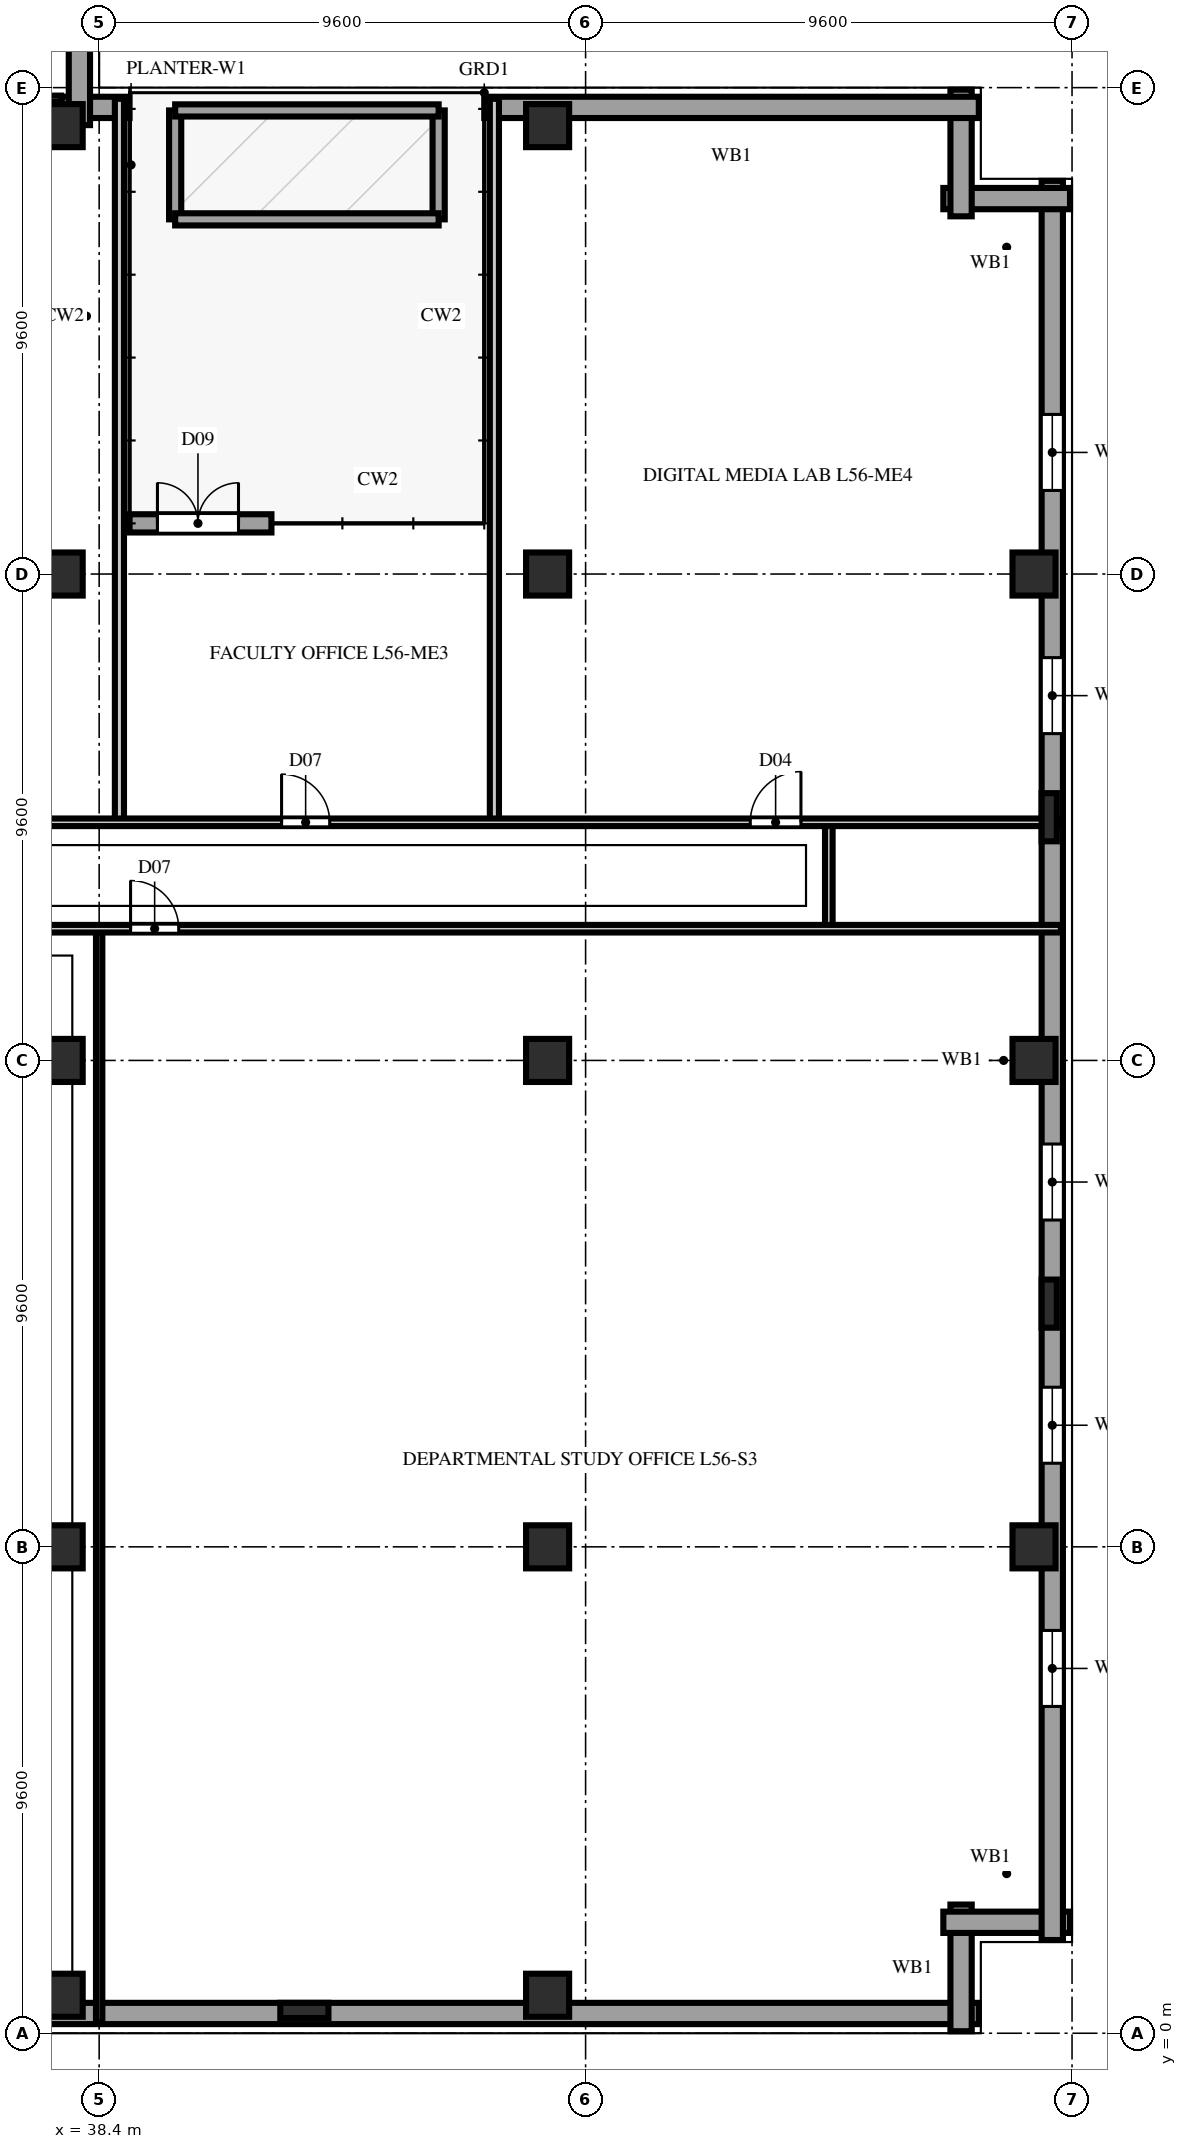
"""IFC4 building model, lengths in metres.
Left out: names, types, materials, properties, quantities, classifications, styles, units other than length and angle.
Written with IfcOpenShell. Run it as: python <this file> out.ifc"""

import sys

from ifc_helpers import new_model, si_unit, direction, frame, frame_2d, origin, origin_2d, place, context, subcontext, project, spatial, rectangle, extrude, element, fill, save


model = new_model("IFC4")
c1 = context("Model", 3, precision=1e-05, world=origin(), true_north=direction((0.0, 1.0)))
c2 = subcontext(c1, "Body", "Model", "MODEL_VIEW")
j1 = project(units=[si_unit("LENGTHUNIT", "METRE"), si_unit("PLANEANGLEUNIT", "RADIAN")], contexts=[c1])
p1 = place(None, origin())
s1 = spatial("IfcSite", under=j1, at=p1, CompositionType="ELEMENT")
p2 = place(p1, origin())
s2 = spatial("IfcBuilding", under=s1, at=p2, CompositionType="ELEMENT")
p3 = place(p2, frame((0.0, 0.0, 221.8)))
s3 = spatial("IfcBuildingStorey", under=s2, at=p3, CompositionType="ELEMENT", Elevation=221.8)
for number, where, z_axis, x_axis in (
    (1, (37.65, 0.75, 0.0), (0.0, 0.0, 1.0), (1.0, 0.0, 0.0)),
    (2, (37.65, 9.6, 0.0), (0.0, 0.0, 1.0), (1.0, 0.0, 0.0)),
    (3, (37.65, 19.2, 0.0), (0.0, 0.0, 1.0), (1.0, 0.0, 0.0)),
    (4, (37.65, 28.8, 0.0), (0.0, 0.0, 1.0), (1.0, 0.0, 0.0)),
    (5, (37.65, 37.65, 0.0), (0.0, 0.0, 1.0), (1.0, 0.0, 0.0)),
    (6, (47.25, 0.75, 0.0), (0.0, 0.0, 1.0), (1.0, 0.0, 0.0)),
    (7, (47.25, 9.6, 0.0), (0.0, 0.0, 1.0), (1.0, 0.0, 0.0)),
    (8, (47.25, 19.2, 0.0), (0.0, 0.0, 1.0), (1.0, 0.0, 0.0)),
    (9, (47.25, 28.8, 0.0), (0.0, 0.0, 1.0), (1.0, 0.0, 0.0)),
    (10, (47.25, 37.65, 0.0), (0.0, 0.0, 1.0), (1.0, 0.0, 0.0)),
    (11, (56.85, 9.6, 0.0), (0.0, 0.0, 1.0), (1.0, 0.0, 0.0)),
    (12, (56.85, 19.2, 0.0), (0.0, 0.0, 1.0), (1.0, 0.0, 0.0)),
    (13, (56.85, 28.8, 0.0), (0.0, 0.0, 1.0), (1.0, 0.0, 0.0)),
):
    element("IfcColumn", number, at=place(p3, frame(where, z_axis=z_axis, x_axis=x_axis)), inside=s3, PredefinedType="COLUMN", context=c2, shape_type="SweptSolid", body=[
        extrude(rectangle(XDim=0.85, YDim=0.85, at=origin_2d()), origin(), (0.0, 0.0, 1.0), 3.8),
    ])
for number, where, z_axis, x_axis in (
    (14, (42.45, 0.45, 0.0), (0.0, 0.0, 1.0), (1.0, 0.0, 0.0)),
    (15, (57.15, 14.4, 0.0), (0.0, 0.0, 1.0), (0.0, 1.0, 0.0)),
    (16, (57.15, 24.0, 0.0), (0.0, 0.0, 1.0), (0.0, 1.0, 0.0)),
):
    element("IfcColumn", number, at=place(p3, frame(where, z_axis=z_axis, x_axis=x_axis)), inside=s3, PredefinedType="PILASTER", context=c2, shape_type="SweptSolid", body=[
        extrude(rectangle(XDim=0.95, YDim=0.3, at=origin_2d()), origin(), (0.0, 0.0, 1.0), 3.8),
    ])
p4 = place(p3, frame((1.84, 0.39, 0.0), z_axis=(0.0, 0.0, 1.0), x_axis=(1.0, 0.0, 0.0)))
e17 = element("IfcWall", 17, at=p4, inside=s3, PredefinedType="SOLIDWALL", context=c2, shape_type="SweptSolid", body=[
    extrude(rectangle(XDim=53.92, YDim=0.42, at=frame_2d((26.96, 0.0))), origin(), (0.0, 0.0, 1.0), 3.54),
])
p5 = place(p4, frame((3.86, 0.0, 0.75)))
e18 = element("IfcOpeningElement", 18, at=p5, cuts=e17, PredefinedType="OPENING", context=c2, shape_type="SweptSolid", body=[
    extrude(rectangle(XDim=3.0, YDim=1.9, at=frame_2d((1.5, 0.95))), frame((0.0, 0.222, 0.0), z_axis=(0.0, -1.0, 0.0), x_axis=(1.0, 0.0, 0.0)), (0.0, 0.0, 1.0), 0.444),
])
p6 = place(p4, frame((8.66, 0.0, 0.75)))
e19 = element("IfcOpeningElement", 19, at=p6, cuts=e17, PredefinedType="OPENING", context=c2, shape_type="SweptSolid", body=[
    extrude(rectangle(XDim=3.0, YDim=1.9, at=frame_2d((1.5, 0.95))), frame((0.0, 0.222, 0.0), z_axis=(0.0, -1.0, 0.0), x_axis=(1.0, 0.0, 0.0)), (0.0, 0.0, 1.0), 0.444),
])
p7 = place(p4, frame((18.26, 0.0, 0.75)))
e20 = element("IfcOpeningElement", 20, at=p7, cuts=e17, PredefinedType="OPENING", context=c2, shape_type="SweptSolid", body=[
    extrude(rectangle(XDim=3.0, YDim=1.9, at=frame_2d((1.5, 0.95))), frame((0.0, 0.222, 0.0), z_axis=(0.0, -1.0, 0.0), x_axis=(1.0, 0.0, 0.0)), (0.0, 0.0, 1.0), 0.444),
])
for number, where, z_axis, x_axis in (
    (21, (55.41, 0.04, 0.0), (0.0, 0.0, 1.0), (0.0, 1.0, 0.0)),
    (22, (55.06, 2.19, 0.0), (0.0, 0.0, 1.0), (1.0, 0.0, 0.0)),
):
    element("IfcWall", number, at=place(p3, frame(where, z_axis=z_axis, x_axis=x_axis)), inside=s3, PredefinedType="SOLIDWALL", context=c2, shape_type="SweptSolid", body=[
        extrude(rectangle(XDim=2.5, YDim=0.42, at=frame_2d((1.25, 0.0))), origin(), (0.0, 0.0, 1.0), 3.54),
    ])
p8 = place(p3, frame((57.21, 1.84, 0.0), z_axis=(0.0, 0.0, 1.0), x_axis=(0.0, 1.0, 0.0)))
e23 = element("IfcWall", 23, at=p8, inside=s3, PredefinedType="SOLIDWALL", context=c2, shape_type="SweptSolid", body=[
    extrude(rectangle(XDim=34.72, YDim=0.42, at=frame_2d((17.36, 0.0))), origin(), (0.0, 0.0, 1.0), 3.54),
])
p9 = place(p8, frame((4.61, 0.0, 0.85)))
e24 = element("IfcOpeningElement", 24, at=p9, cuts=e23, PredefinedType="OPENING", context=c2, shape_type="SweptSolid", body=[
    extrude(rectangle(XDim=1.5, YDim=1.85, at=frame_2d((0.75, 0.925))), frame((0.0, 0.222, 0.0), z_axis=(0.0, -1.0, 0.0), x_axis=(1.0, 0.0, 0.0)), (0.0, 0.0, 1.0), 0.444),
])
p10 = place(p8, frame((9.41, 0.0, 0.85)))
e25 = element("IfcOpeningElement", 25, at=p10, cuts=e23, PredefinedType="OPENING", context=c2, shape_type="SweptSolid", body=[
    extrude(rectangle(XDim=1.5, YDim=1.85, at=frame_2d((0.75, 0.925))), frame((0.0, 0.222, 0.0), z_axis=(0.0, -1.0, 0.0), x_axis=(1.0, 0.0, 0.0)), (0.0, 0.0, 1.0), 0.444),
])
p11 = place(p8, frame((14.21, 0.0, 0.85)))
e26 = element("IfcOpeningElement", 26, at=p11, cuts=e23, PredefinedType="OPENING", context=c2, shape_type="SweptSolid", body=[
    extrude(rectangle(XDim=1.5, YDim=1.85, at=frame_2d((0.75, 0.925))), frame((0.0, 0.222, 0.0), z_axis=(0.0, -1.0, 0.0), x_axis=(1.0, 0.0, 0.0)), (0.0, 0.0, 1.0), 0.444),
])
p12 = place(p8, frame((23.81, 0.0, 0.85)))
e27 = element("IfcOpeningElement", 27, at=p12, cuts=e23, PredefinedType="OPENING", context=c2, shape_type="SweptSolid", body=[
    extrude(rectangle(XDim=1.5, YDim=1.85, at=frame_2d((0.75, 0.925))), frame((0.0, 0.222, 0.0), z_axis=(0.0, -1.0, 0.0), x_axis=(1.0, 0.0, 0.0)), (0.0, 0.0, 1.0), 0.444),
])
p13 = place(p8, frame((28.61, 0.0, 0.85)))
e28 = element("IfcOpeningElement", 28, at=p13, cuts=e23, PredefinedType="OPENING", context=c2, shape_type="SweptSolid", body=[
    extrude(rectangle(XDim=1.5, YDim=1.85, at=frame_2d((0.75, 0.925))), frame((0.0, 0.222, 0.0), z_axis=(0.0, -1.0, 0.0), x_axis=(1.0, 0.0, 0.0)), (0.0, 0.0, 1.0), 0.444),
])
for number, where, z_axis, x_axis in (
    (29, (57.56, 36.21, 0.0), (0.0, 0.0, 1.0), (-1.0, 0.0, 0.0)),
    (30, (55.41, 35.86, 0.0), (0.0, 0.0, 1.0), (0.0, 1.0, 0.0)),
):
    element("IfcWall", number, at=place(p3, frame(where, z_axis=z_axis, x_axis=x_axis)), inside=s3, PredefinedType="SOLIDWALL", context=c2, shape_type="SweptSolid", body=[
        extrude(rectangle(XDim=2.5, YDim=0.42, at=frame_2d((1.25, 0.0))), origin(), (0.0, 0.0, 1.0), 3.54),
    ])
p14 = place(p3, frame((55.76, 38.01, 0.0), z_axis=(0.0, 0.0, 1.0), x_axis=(-1.0, 0.0, 0.0)))
e31 = element("IfcWall", 31, at=p14, inside=s3, PredefinedType="SOLIDWALL", context=c2, shape_type="SweptSolid", body=[
    extrude(rectangle(XDim=9.76, YDim=0.42, at=frame_2d((4.88, 0.0))), origin(), (0.0, 0.0, 1.0), 3.54),
])
p15 = place(p3, frame((39.0, 38.01, 0.0), z_axis=(0.0, 0.0, 1.0), x_axis=(-1.0, 0.0, 0.0)))
e32 = element("IfcWall", 32, at=p15, inside=s3, PredefinedType="SOLIDWALL", context=c2, shape_type="SweptSolid", body=[
    extrude(rectangle(XDim=1.34, YDim=0.42, at=frame_2d((0.67, 0.0))), origin(), (0.0, 0.0, 1.0), 3.54),
])
p16 = place(p3, frame((38.01, 37.66, 0.0), z_axis=(0.0, 0.0, 1.0), x_axis=(0.0, 1.0, 0.0)))
e33 = element("IfcWall", 33, at=p16, inside=s3, PredefinedType="SOLIDWALL", context=c2, shape_type="SweptSolid", body=[
    extrude(rectangle(XDim=18.1, YDim=0.42, at=frame_2d((9.05, 0.0))), origin(), (0.0, 0.0, 1.0), 3.54),
])
p17 = place(p3, frame((39.0, 29.8, 0.0), z_axis=(0.0, 0.0, 1.0), x_axis=(1.0, 0.0, 0.0)))
e34 = element("IfcWall", 34, at=p17, inside=s3, PredefinedType="SOLIDWALL", context=c2, shape_type="SweptSolid", body=[
    extrude(rectangle(XDim=2.8, YDim=0.36, at=frame_2d((1.4, 0.0))), origin(), (0.0, 0.0, 1.0), 3.54),
])
p18 = place(p17, frame((0.55, 0.0, 0.0)))
e35 = element("IfcOpeningElement", 35, at=p18, cuts=e34, PredefinedType="OPENING", context=c2, shape_type="SweptSolid", body=[
    extrude(rectangle(XDim=1.6, YDim=2.3, at=frame_2d((0.8, 1.15))), frame((0.0, 0.192, 0.0), z_axis=(0.0, -1.0, 0.0), x_axis=(1.0, 0.0, 0.0)), (0.0, 0.0, 1.0), 0.384),
])
for number, where, z_axis, x_axis in (
    (36, (39.9, 35.8, 0.0), (0.0, 0.0, 1.0), (0.0, 1.0, 0.0)),
    (37, (45.1, 35.8, 0.0), (0.0, 0.0, 1.0), (0.0, 1.0, 0.0)),
):
    element("IfcWall", number, at=place(p3, frame(where, z_axis=z_axis, x_axis=x_axis)), inside=s3, PredefinedType="USERDEFINED", context=c2, shape_type="SweptSolid", body=[
        extrude(rectangle(XDim=2.15, YDim=0.24, at=frame_2d((1.075, 0.0))), origin(), (0.0, 0.0, 1.0), 0.62),
    ])
for number, where, z_axis, x_axis in (
    (38, (39.9, 35.8, 0.0), (0.0, 0.0, 1.0), (1.0, 0.0, 0.0)),
    (39, (39.9, 37.95, 0.0), (0.0, 0.0, 1.0), (1.0, 0.0, 0.0)),
):
    element("IfcWall", number, at=place(p3, frame(where, z_axis=z_axis, x_axis=x_axis)), inside=s3, PredefinedType="USERDEFINED", context=c2, shape_type="SweptSolid", body=[
        extrude(rectangle(XDim=5.2, YDim=0.24, at=frame_2d((2.6, 0.0))), origin(), (0.0, 0.0, 1.0), 0.62),
    ])
p19 = place(p3, frame((52.8, 21.8, 0.0), z_axis=(0.0, 0.0, 1.0), x_axis=(0.0, 1.0, 0.0)))
e40 = element("IfcWall", 40, at=p19, inside=s3, PredefinedType="PARTITIONING", context=c2, shape_type="SweptSolid", body=[
    extrude(rectangle(XDim=2.1, YDim=0.15, at=frame_2d((1.05, 0.0))), origin(), (0.0, 0.0, 1.0), 3.54),
])
p20 = place(p3, frame((38.4, 0.22, 0.0), z_axis=(0.0, 0.0, 1.0), x_axis=(0.0, 1.0, 0.0)))
e41 = element("IfcWall", 41, at=p20, inside=s3, PredefinedType="PARTITIONING", context=c2, shape_type="SweptSolid", body=[
    extrude(rectangle(XDim=21.58, YDim=0.125, at=frame_2d((10.79, 0.0))), origin(), (0.0, 0.0, 1.0), 3.54),
])
p21 = place(p3, frame((33.62, 21.8, 0.0), z_axis=(0.0, 0.0, 1.0), x_axis=(1.0, 0.0, 0.0)))
e42 = element("IfcWall", 42, at=p21, inside=s3, PredefinedType="PARTITIONING", context=c2, shape_type="SweptSolid", body=[
    extrude(rectangle(XDim=23.76, YDim=0.15, at=frame_2d((11.88, 0.0))), origin(), (0.0, 0.0, 1.0), 3.54),
])
p22 = place(p21, frame((1.4, 0.0, 0.0)))
e43 = element("IfcOpeningElement", 43, at=p22, cuts=e42, PredefinedType="OPENING", context=c2, shape_type="SweptSolid", body=[
    extrude(rectangle(XDim=2.0, YDim=2.3, at=frame_2d((1.0, 1.15))), frame((0.0, 0.087, 0.0), z_axis=(0.0, -1.0, 0.0), x_axis=(1.0, 0.0, 0.0)), (0.0, 0.0, 1.0), 0.174),
])
p23 = place(p21, frame((5.4, 0.0, 0.0)))
e44 = element("IfcOpeningElement", 44, at=p23, cuts=e42, PredefinedType="OPENING", context=c2, shape_type="SweptSolid", body=[
    extrude(rectangle(XDim=0.95, YDim=2.15, at=frame_2d((0.475, 1.075))), frame((0.0, 0.087, 0.0), z_axis=(0.0, -1.0, 0.0), x_axis=(1.0, 0.0, 0.0)), (0.0, 0.0, 1.0), 0.174),
])
for number, where, z_axis, x_axis in (
    (45, (38.8, 23.9, 0.0), (0.0, 0.0, 1.0), (0.0, 1.0, 0.0)),
    (46, (46.2, 23.9, 0.0), (0.0, 0.0, 1.0), (0.0, 1.0, 0.0)),
):
    element("IfcWall", number, at=place(p3, frame(where, z_axis=z_axis, x_axis=x_axis)), inside=s3, PredefinedType="PARTITIONING", context=c2, shape_type="SweptSolid", body=[
        extrude(rectangle(XDim=14.28, YDim=0.18, at=frame_2d((7.14, 0.0))), origin(), (0.0, 0.0, 1.0), 3.54),
    ])
p24 = place(p3, frame((19.2, 23.9, 0.0), z_axis=(0.0, 0.0, 1.0), x_axis=(1.0, 0.0, 0.0)))
e47 = element("IfcWall", 47, at=p24, inside=s3, PredefinedType="PARTITIONING", context=c2, shape_type="SweptSolid", body=[
    extrude(rectangle(XDim=38.18, YDim=0.15, at=frame_2d((19.09, 0.0))), origin(), (0.0, 0.0, 1.0), 3.54),
])
p25 = place(p24, frame((3.05, 0.0, 0.0)))
e48 = element("IfcOpeningElement", 48, at=p25, cuts=e47, PredefinedType="OPENING", context=c2, shape_type="SweptSolid", body=[
    extrude(rectangle(XDim=1.2, YDim=2.2, at=frame_2d((0.6, 1.1))), frame((0.0, 0.087, 0.0), z_axis=(0.0, -1.0, 0.0), x_axis=(1.0, 0.0, 0.0)), (0.0, 0.0, 1.0), 0.174),
])
p26 = place(p24, frame((13.6, 0.0, 0.0)))
e49 = element("IfcOpeningElement", 49, at=p26, cuts=e47, PredefinedType="OPENING", context=c2, shape_type="SweptSolid", body=[
    extrude(rectangle(XDim=0.95, YDim=2.15, at=frame_2d((0.475, 1.075))), frame((0.0, 0.087, 0.0), z_axis=(0.0, -1.0, 0.0), x_axis=(1.0, 0.0, 0.0)), (0.0, 0.0, 1.0), 0.174),
])
p27 = place(p24, frame((22.8, 0.0, 0.0)))
e50 = element("IfcOpeningElement", 50, at=p27, cuts=e47, PredefinedType="OPENING", context=c2, shape_type="SweptSolid", body=[
    extrude(rectangle(XDim=0.95, YDim=2.15, at=frame_2d((0.475, 1.075))), frame((0.0, 0.087, 0.0), z_axis=(0.0, -1.0, 0.0), x_axis=(1.0, 0.0, 0.0)), (0.0, 0.0, 1.0), 0.174),
])
p28 = place(p24, frame((32.05, 0.0, 0.0)))
e51 = element("IfcOpeningElement", 51, at=p28, cuts=e47, PredefinedType="OPENING", context=c2, shape_type="SweptSolid", body=[
    extrude(rectangle(XDim=1.0, YDim=2.2, at=frame_2d((0.5, 1.1))), frame((0.0, 0.087, 0.0), z_axis=(0.0, -1.0, 0.0), x_axis=(1.0, 0.0, 0.0)), (0.0, 0.0, 1.0), 0.174),
])
p29 = place(p3, frame((19.28, 38.18, 0.0), z_axis=(0.0, 0.0, 1.0), x_axis=(1.0, 0.0, 0.0)))
e52 = element("IfcWall", 52, at=p29, inside=s3, PredefinedType="PARTITIONING", context=c2, shape_type="SweptSolid", body=[
    extrude(rectangle(XDim=18.37, YDim=0.125, at=frame_2d((9.185, 0.0))), origin(), (0.0, 0.0, 1.0), 3.54),
])
p30 = place(p9, origin())
e53 = element("IfcWindow", 53, at=p30, inside=s3, PartitioningType="DOUBLE_PANEL_VERTICAL", PredefinedType="WINDOW", context=c2, shape_type="SweptSolid", body=[
    extrude(rectangle(XDim=1.5, YDim=1.85, at=frame_2d((0.75, 0.925))), frame((0.0, 0.11, 0.0), z_axis=(0.0, -1.0, 0.0), x_axis=(1.0, 0.0, 0.0)), (0.0, 0.0, 1.0), 0.06),
])
fill(e24, e53)
p31 = place(p10, origin())
e54 = element("IfcWindow", 54, at=p31, inside=s3, PartitioningType="DOUBLE_PANEL_VERTICAL", PredefinedType="WINDOW", context=c2, shape_type="SweptSolid", body=[
    extrude(rectangle(XDim=1.5, YDim=1.85, at=frame_2d((0.75, 0.925))), frame((0.0, 0.11, 0.0), z_axis=(0.0, -1.0, 0.0), x_axis=(1.0, 0.0, 0.0)), (0.0, 0.0, 1.0), 0.06),
])
fill(e25, e54)
p32 = place(p11, origin())
e55 = element("IfcWindow", 55, at=p32, inside=s3, PartitioningType="DOUBLE_PANEL_VERTICAL", PredefinedType="WINDOW", context=c2, shape_type="SweptSolid", body=[
    extrude(rectangle(XDim=1.5, YDim=1.85, at=frame_2d((0.75, 0.925))), frame((0.0, 0.11, 0.0), z_axis=(0.0, -1.0, 0.0), x_axis=(1.0, 0.0, 0.0)), (0.0, 0.0, 1.0), 0.06),
])
fill(e26, e55)
p33 = place(p12, origin())
e56 = element("IfcWindow", 56, at=p33, inside=s3, PartitioningType="DOUBLE_PANEL_VERTICAL", PredefinedType="WINDOW", context=c2, shape_type="SweptSolid", body=[
    extrude(rectangle(XDim=1.5, YDim=1.85, at=frame_2d((0.75, 0.925))), frame((0.0, 0.11, 0.0), z_axis=(0.0, -1.0, 0.0), x_axis=(1.0, 0.0, 0.0)), (0.0, 0.0, 1.0), 0.06),
])
fill(e27, e56)
p34 = place(p13, origin())
e57 = element("IfcWindow", 57, at=p34, inside=s3, PartitioningType="DOUBLE_PANEL_VERTICAL", PredefinedType="WINDOW", context=c2, shape_type="SweptSolid", body=[
    extrude(rectangle(XDim=1.5, YDim=1.85, at=frame_2d((0.75, 0.925))), frame((0.0, 0.11, 0.0), z_axis=(0.0, -1.0, 0.0), x_axis=(1.0, 0.0, 0.0)), (0.0, 0.0, 1.0), 0.06),
])
fill(e28, e57)
p35 = place(p18, origin())
e58 = element("IfcDoor", 58, at=p35, inside=s3, OperationType="DOUBLE_SWING_LEFT", PredefinedType="DOOR", context=c2, shape_type="SweptSolid", body=[
    extrude(rectangle(XDim=1.6, YDim=2.3, at=frame_2d((0.8, 1.15))), frame((0.0, 0.025, 0.0), z_axis=(0.0, -1.0, 0.0), x_axis=(1.0, 0.0, 0.0)), (0.0, 0.0, 1.0), 0.05),
])
fill(e35, e58)
p36 = place(p23, origin())
e59 = element("IfcDoor", 59, at=p36, inside=s3, OperationType="SINGLE_SWING_LEFT", PredefinedType="DOOR", context=c2, shape_type="SweptSolid", body=[
    extrude(rectangle(XDim=0.95, YDim=2.15, at=frame_2d((0.475, 1.075))), frame((0.0, 0.025, 0.0), z_axis=(0.0, -1.0, 0.0), x_axis=(1.0, 0.0, 0.0)), (0.0, 0.0, 1.0), 0.05),
])
fill(e44, e59)
p37 = place(p27, origin())
e60 = element("IfcDoor", 60, at=p37, inside=s3, OperationType="SINGLE_SWING_LEFT", PredefinedType="DOOR", context=c2, shape_type="SweptSolid", body=[
    extrude(rectangle(XDim=0.95, YDim=2.15, at=frame_2d((0.475, 1.075))), frame((0.0, 0.025, 0.0), z_axis=(0.0, -1.0, 0.0), x_axis=(1.0, 0.0, 0.0)), (0.0, 0.0, 1.0), 0.05),
])
fill(e50, e60)
p38 = place(p28, origin())
e61 = element("IfcDoor", 61, at=p38, inside=s3, OperationType="SINGLE_SWING_RIGHT", PredefinedType="DOOR", context=c2, shape_type="SweptSolid", body=[
    extrude(rectangle(XDim=1.0, YDim=2.2, at=frame_2d((0.5, 1.1))), frame((0.0, 0.025, 0.0), z_axis=(0.0, -1.0, 0.0), x_axis=(1.0, 0.0, 0.0)), (0.0, 0.0, 1.0), 0.05),
])
fill(e51, e61)
save(model, sys.argv[1])
